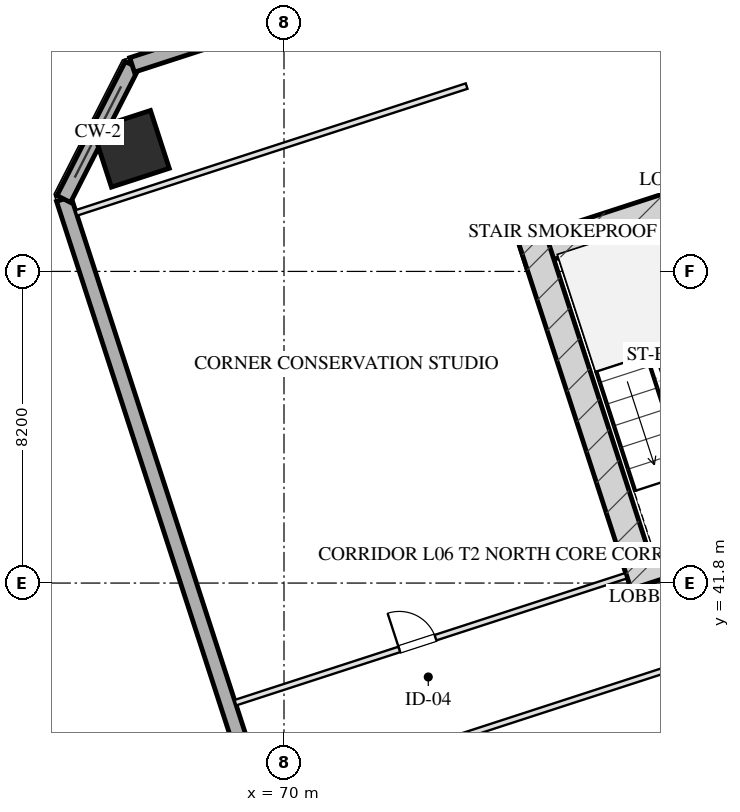
"""IFC4 building model, lengths in metres.
Left out: names, types, materials, properties, quantities, classifications, styles, units other than length and angle.
Written with IfcOpenShell. Run it as: python <this file> out.ifc"""

import sys

from ifc_helpers import new_model, si_unit, direction, frame, frame_2d, origin, origin_2d, place, context, subcontext, project, spatial, rectangle, hollow_rectangle, extrude, element, fill, save


model = new_model("IFC4")
c1 = context("Model", 3, precision=1e-05, world=origin(), true_north=direction((0.0, 1.0)))
c2 = subcontext(c1, "Body", "Model", "MODEL_VIEW")
j1 = project(units=[si_unit("LENGTHUNIT", "METRE"), si_unit("PLANEANGLEUNIT", "RADIAN")], contexts=[c1])
p1 = place(None, origin())
s1 = spatial("IfcSite", under=j1, at=p1, CompositionType="ELEMENT")
p2 = place(p1, origin())
s2 = spatial("IfcBuilding", under=s1, at=p2, CompositionType="ELEMENT")
p3 = place(p2, frame((0.0, 0.0, 30.0)))
s3 = spatial("IfcBuildingStorey", under=s2, at=p3, CompositionType="ELEMENT", Elevation=30.0)
p4 = place(p3, frame((76.272, 50.443, 0.0), z_axis=(0.0, 0.0, 1.0), x_axis=(0.951056072937, 0.309018358888, 0.0)))
e1 = element("IfcWall", 1, at=p4, inside=s3, PredefinedType="SHEAR", context=c2, shape_type="SweptSolid", body=[
    extrude(rectangle(XDim=16.55, YDim=0.75, at=frame_2d((8.275, 0.0))), origin(), (0.0, 0.0, 1.0), 4.0),
])
p5 = place(p3, frame((79.489, 41.756, 0.0), z_axis=(0.0, 0.0, 1.0), x_axis=(-0.309016134813, 0.951056795583, 0.0)))
e2 = element("IfcWall", 2, at=p5, inside=s3, PredefinedType="SHEAR", context=c2, shape_type="SweptSolid", body=[
    extrude(rectangle(XDim=9.63, YDim=0.75, at=frame_2d((4.815, 0.0))), origin(), (0.0, 0.0, 1.0), 4.0),
])
p6 = place(p3, frame((79.016, 41.997, 0.0), z_axis=(0.0, 0.0, 1.0), x_axis=(0.95106038264, 0.309005094736, 0.0)))
e3 = element("IfcWall", 3, at=p6, inside=s3, PredefinedType="SHEAR", context=c2, shape_type="SweptSolid", body=[
    extrude(rectangle(XDim=4.295, YDim=0.75, at=frame_2d((2.147, 0.0))), origin(), (0.0, 0.0, 1.0), 4.0),
])
p7 = place(p3, frame((65.973, 53.226, 0.0), z_axis=(0.0, 0.0, 1.0), x_axis=(0.951056516295, 0.309016994375, 0.0)))
e4 = element("IfcColumn", 4, at=p7, inside=s3, PredefinedType="COLUMN", context=c2, shape_type="SweptSolid", body=[
    extrude(hollow_rectangle(XDim=1.6, YDim=1.6, WallThickness=0.055, at=origin_2d()), origin(), (0.0, 0.0, 1.0), 4.001),
])
p8 = place(p3, frame((79.655, 4.352, 0.0), z_axis=(0.0, 0.0, 1.0), x_axis=(-0.309014526607, 0.951057318118, 0.0)))
e5 = element("IfcWall", 5, at=p8, inside=s3, PredefinedType="SOLIDWALL", context=c2, shape_type="SweptSolid", body=[
    extrude(rectangle(XDim=50.0, YDim=0.4, at=frame_2d((25.0, 0.0))), origin(), (0.0, 0.0, 1.0), 3.16),
])
p9 = place(p8, frame((17.35, 0.0, 0.75)))
e6 = element("IfcOpeningElement", 6, at=p9, cuts=e5, PredefinedType="OPENING", context=c2, shape_type="SweptSolid", body=[
    extrude(rectangle(XDim=2.5, YDim=1.75, at=frame_2d((1.25, 0.875))), frame((0.0, 0.21, 0.0), z_axis=(0.0, -1.0, 0.0), x_axis=(1.0, 0.0, 0.0)), (0.0, 0.0, 1.0), 0.42),
])
p10 = place(p8, frame((21.15, 0.0, 0.75)))
e7 = element("IfcOpeningElement", 7, at=p10, cuts=e5, PredefinedType="OPENING", context=c2, shape_type="SweptSolid", body=[
    extrude(rectangle(XDim=2.5, YDim=1.75, at=frame_2d((1.25, 0.875))), frame((0.0, 0.21, 0.0), z_axis=(0.0, -1.0, 0.0), x_axis=(1.0, 0.0, 0.0)), (0.0, 0.0, 1.0), 0.42),
])
p11 = place(p8, frame((26.35, 0.0, 0.75)))
e8 = element("IfcOpeningElement", 8, at=p11, cuts=e5, PredefinedType="OPENING", context=c2, shape_type="SweptSolid", body=[
    extrude(rectangle(XDim=2.5, YDim=1.75, at=frame_2d((1.25, 0.875))), frame((0.0, 0.21, 0.0), z_axis=(0.0, -1.0, 0.0), x_axis=(1.0, 0.0, 0.0)), (0.0, 0.0, 1.0), 0.42),
])
p12 = place(p8, frame((30.15, 0.0, 0.75)))
e9 = element("IfcOpeningElement", 9, at=p12, cuts=e5, PredefinedType="OPENING", context=c2, shape_type="SweptSolid", body=[
    extrude(rectangle(XDim=2.5, YDim=1.75, at=frame_2d((1.25, 0.875))), frame((0.0, 0.21, 0.0), z_axis=(0.0, -1.0, 0.0), x_axis=(1.0, 0.0, 0.0)), (0.0, 0.0, 1.0), 0.42),
])
p13 = place(p3, frame((64.205, 51.905, 0.0), z_axis=(0.0, 0.0, 1.0), x_axis=(0.453958106755, 0.891023028497, 0.0)))
e10 = element("IfcWall", 10, at=p13, inside=s3, PredefinedType="SOLIDWALL", context=c2, shape_type="SweptSolid", body=[
    extrude(rectangle(XDim=3.96, YDim=0.4, at=frame_2d((1.98, 0.0))), origin(), (0.0, 0.0, 1.0), 3.16),
])
p14 = place(p3, frame((66.002, 55.433, 0.0), z_axis=(0.0, 0.0, 1.0), x_axis=(0.951055939317, 0.309018770125, 0.0)))
e11 = element("IfcWall", 11, at=p14, inside=s3, PredefinedType="SOLIDWALL", context=c2, shape_type="SweptSolid", body=[
    extrude(rectangle(XDim=32.4, YDim=0.4, at=frame_2d((16.2, 0.0))), origin(), (0.0, 0.0, 1.0), 3.16),
])
p15 = place(p3, frame((64.534, 51.539, 0.0), z_axis=(0.0, 0.0, 1.0), x_axis=(0.951056658866, 0.309016555588, 0.0)))
e12 = element("IfcWall", 12, at=p15, inside=s3, PredefinedType="PARTITIONING", context=c2, shape_type="SweptSolid", body=[
    extrude(rectangle(XDim=10.8, YDim=0.15, at=frame_2d((5.4, 0.0))), origin(), (0.0, 0.0, 1.0), 3.725),
])
p16 = place(p3, frame((68.721, 38.652, 0.0), z_axis=(0.0, 0.0, 1.0), x_axis=(0.951056658866, 0.309016555588, 0.0)))
e13 = element("IfcWall", 13, at=p16, inside=s3, PredefinedType="PARTITIONING", context=c2, shape_type="SweptSolid", body=[
    extrude(rectangle(XDim=10.8, YDim=0.15, at=frame_2d((5.4, 0.0))), origin(), (0.0, 0.0, 1.0), 3.725),
])
p17 = place(p16, frame((4.536, 0.0, 0.0)))
e14 = element("IfcOpeningElement", 14, at=p17, cuts=e13, PredefinedType="OPENING", context=c2, shape_type="SweptSolid", body=[
    extrude(rectangle(XDim=1.0, YDim=2.05, at=frame_2d((0.5, 1.025))), frame((0.0, 0.085, 0.0), z_axis=(0.0, -1.0, 0.0), x_axis=(1.0, 0.0, 0.0)), (0.0, 0.0, 1.0), 0.17),
])
p18 = place(p3, frame((69.549, 36.103, 0.0), z_axis=(0.0, 0.0, 1.0), x_axis=(0.951058077006, 0.309012190961, 0.0)))
e15 = element("IfcWall", 15, at=p18, inside=s3, PredefinedType="PARTITIONING", context=c2, shape_type="SweptSolid", body=[
    extrude(rectangle(XDim=13.375, YDim=0.15, at=frame_2d((6.688, 0.0))), origin(), (0.0, 0.0, 1.0), 3.725),
])
p19 = place(p17, origin())
e16 = element("IfcDoor", 16, at=p19, inside=s3, OperationType="SINGLE_SWING_LEFT", PredefinedType="DOOR", context=c2, shape_type="SweptSolid", body=[
    extrude(rectangle(XDim=1.0, YDim=2.05, at=frame_2d((0.5, 1.025))), frame((0.0, 0.025, 0.0), z_axis=(0.0, -1.0, 0.0), x_axis=(1.0, 0.0, 0.0)), (0.0, 0.0, 1.0), 0.05),
])
fill(e14, e16)
save(model, sys.argv[1])
